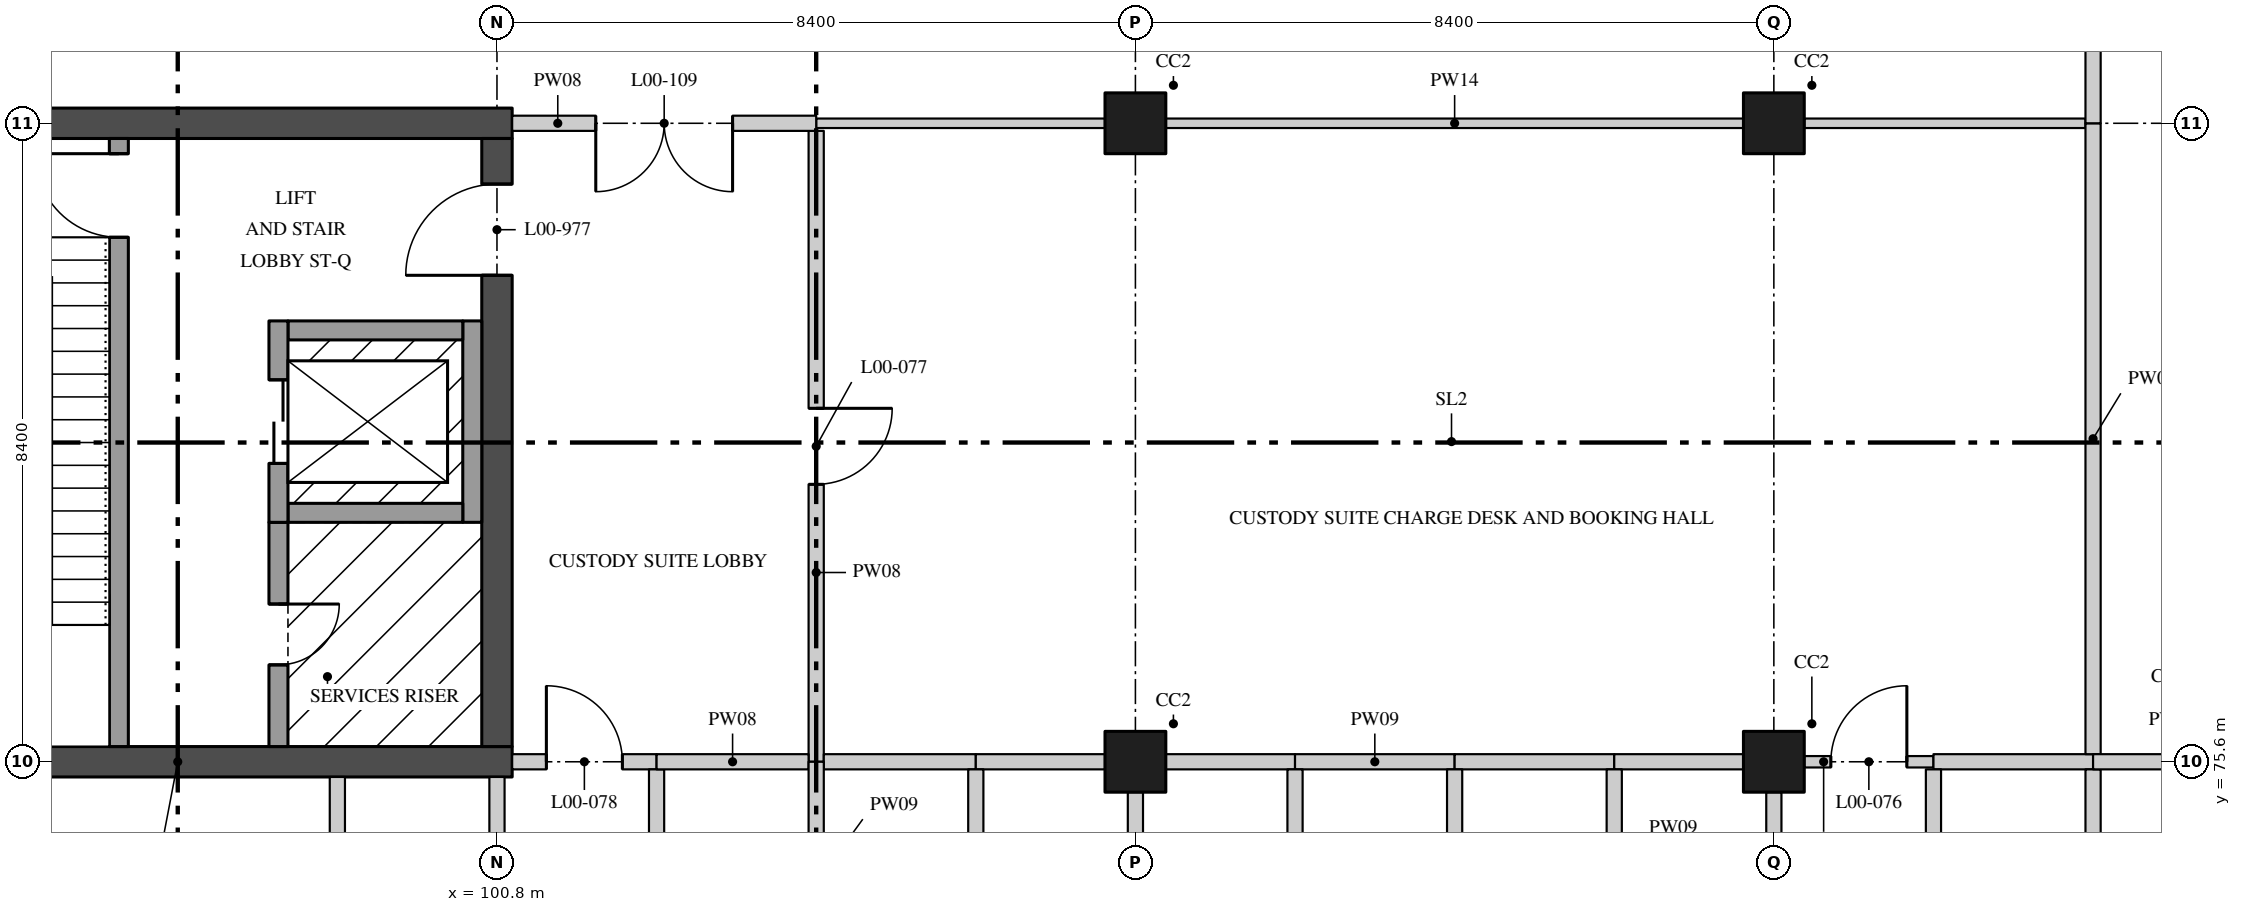
"""IFC4 building model, lengths in metres.
Left out: names, types, materials, properties, quantities, classifications, styles, units other than length and angle.
Written with IfcOpenShell. Run it as: python <this file> out.ifc"""

import sys

from ifc_helpers import new_model, si_unit, direction, frame, frame_2d, origin, origin_2d, place, context, subcontext, project, spatial, rectangle, extrude, element, fill, save


model = new_model("IFC4")
c1 = context("Model", 3, precision=1e-05, world=origin(), true_north=direction((0.0, 1.0)))
c2 = subcontext(c1, "Body", "Model", "MODEL_VIEW")
j1 = project(units=[si_unit("LENGTHUNIT", "METRE"), si_unit("PLANEANGLEUNIT", "RADIAN")], contexts=[c1])
p1 = place(None, origin())
s1 = spatial("IfcSite", under=j1, at=p1, CompositionType="ELEMENT")
p2 = place(p1, origin())
s2 = spatial("IfcBuilding", under=s1, at=p2, CompositionType="ELEMENT")
p3 = place(p2, origin())
s3 = spatial("IfcBuildingStorey", under=s2, at=p3, CompositionType="ELEMENT", Elevation=0.0)
for number, where, z_axis, x_axis in (
    (1, (109.2, 75.6, 0.0), (0.0, 0.0, 1.0), (1.0, 0.0, 0.0)),
    (2, (109.2, 84.0, 0.0), (0.0, 0.0, 1.0), (1.0, 0.0, 0.0)),
    (3, (117.6, 75.6, 0.0), (0.0, 0.0, 1.0), (1.0, 0.0, 0.0)),
    (4, (117.6, 84.0, 0.0), (0.0, 0.0, 1.0), (1.0, 0.0, 0.0)),
):
    element("IfcColumn", number, at=place(p3, frame(where, z_axis=z_axis, x_axis=x_axis)), inside=s3, PredefinedType="COLUMN", context=c2, shape_type="SweptSolid", body=[
        extrude(rectangle(XDim=0.8, YDim=0.8, at=origin_2d()), origin(), (0.0, 0.0, 1.0), 5.05),
    ])
for number, where, z_axis, x_axis in (
    (5, (92.2, 75.6, 0.0), (0.0, 0.0, 1.0), (1.0, 0.0, 0.0)),
    (6, (92.2, 84.0, 0.0), (0.0, 0.0, 1.0), (1.0, 0.0, 0.0)),
):
    element("IfcWall", number, at=place(p3, frame(where, z_axis=z_axis, x_axis=x_axis)), inside=s3, PredefinedType="SHEAR", context=c2, shape_type="SweptSolid", body=[
        extrude(rectangle(XDim=8.8, YDim=0.4, at=frame_2d((4.4, 0.0))), origin(), (0.0, 0.0, 1.0), 5.05),
    ])
p4 = place(p3, frame((100.8, 75.8, 0.0), z_axis=(0.0, 0.0, 1.0), x_axis=(0.0, 1.0, 0.0)))
e7 = element("IfcWall", 7, at=p4, inside=s3, PredefinedType="SHEAR", context=c2, shape_type="SweptSolid", body=[
    extrude(rectangle(XDim=8.0, YDim=0.4, at=frame_2d((4.0, 0.0))), origin(), (0.0, 0.0, 1.0), 5.05),
])
p5 = place(p4, frame((6.2, 0.0, 0.0)))
e8 = element("IfcOpeningElement", 8, at=p5, cuts=e7, PredefinedType="OPENING", context=c2, shape_type="SweptSolid", body=[
    extrude(rectangle(XDim=1.2, YDim=2.1, at=frame_2d((0.6, 1.05))), frame((0.0, 0.21, 0.0), z_axis=(0.0, -1.0, 0.0), x_axis=(1.0, 0.0, 0.0)), (0.0, 0.0, 1.0), 0.42),
])
p6 = place(p3, frame((95.825, 83.8, 0.0), z_axis=(0.0, 0.0, 1.0), x_axis=(0.0, -1.0, 0.0)))
e9 = element("IfcWall", 9, at=p6, inside=s3, PredefinedType="SOLIDWALL", context=c2, shape_type="SweptSolid", body=[
    extrude(rectangle(XDim=8.0, YDim=0.25, at=frame_2d((4.0, 0.0))), origin(), (0.0, 0.0, 1.0), 5.05),
])
p7 = place(p6, frame((0.2, 0.0, 0.0)))
e10 = element("IfcOpeningElement", 10, at=p7, cuts=e9, PredefinedType="OPENING", context=c2, shape_type="SweptSolid", body=[
    extrude(rectangle(XDim=1.1, YDim=2.1, at=frame_2d((0.55, 1.05))), frame((0.0, 0.135, 0.0), z_axis=(0.0, -1.0, 0.0), x_axis=(1.0, 0.0, 0.0)), (0.0, 0.0, 1.0), 0.27),
])
p8 = place(p3, frame((97.925, 78.75, 0.0), z_axis=(0.0, 0.0, 1.0), x_axis=(0.0, -1.0, 0.0)))
e11 = element("IfcWall", 11, at=p8, inside=s3, PredefinedType="SOLIDWALL", context=c2, shape_type="SweptSolid", body=[
    extrude(rectangle(XDim=2.95, YDim=0.25, at=frame_2d((1.475, 0.0))), origin(), (0.0, 0.0, 1.0), 5.05),
])
p9 = place(p8, frame((1.075, 0.0, 0.0)))
e12 = element("IfcOpeningElement", 12, at=p9, cuts=e11, PredefinedType="OPENING", context=c2, shape_type="SweptSolid", body=[
    extrude(rectangle(XDim=0.8, YDim=2.1, at=frame_2d((0.4, 1.05))), frame((0.0, 0.135, 0.0), z_axis=(0.0, -1.0, 0.0), x_axis=(1.0, 0.0, 0.0)), (0.0, 0.0, 1.0), 0.27),
])
p10 = place(p3, frame((100.475, 78.75, 0.0), z_axis=(0.0, 0.0, 1.0), x_axis=(0.0, 1.0, 0.0)))
e13 = element("IfcWall", 13, at=p10, inside=s3, PredefinedType="SOLIDWALL", context=c2, shape_type="SweptSolid", body=[
    extrude(rectangle(XDim=2.65, YDim=0.25, at=frame_2d((1.325, 0.0))), origin(), (0.0, 0.0, 1.0), 5.05),
])
for number, where, z_axis, x_axis in (
    (14, (98.05, 81.275, 0.0), (0.0, 0.0, 1.0), (1.0, 0.0, 0.0)),
    (15, (98.05, 78.875, 0.0), (0.0, 0.0, 1.0), (1.0, 0.0, 0.0)),
):
    element("IfcWall", number, at=place(p3, frame(where, z_axis=z_axis, x_axis=x_axis)), inside=s3, PredefinedType="SOLIDWALL", context=c2, shape_type="SweptSolid", body=[
        extrude(rectangle(XDim=2.3, YDim=0.25, at=frame_2d((1.15, 0.0))), origin(), (0.0, 0.0, 1.0), 5.05),
    ])
p11 = place(p3, frame((97.925, 78.75, 0.0), z_axis=(0.0, 0.0, 1.0), x_axis=(0.0, 1.0, 0.0)))
e16 = element("IfcWall", 16, at=p11, inside=s3, PredefinedType="SOLIDWALL", context=c2, shape_type="SweptSolid", body=[
    extrude(rectangle(XDim=2.65, YDim=0.25, at=frame_2d((1.325, 0.0))), origin(), (0.0, 0.0, 1.0), 5.05),
])
p12 = place(p11, frame((0.775, 0.0, 0.0)))
e17 = element("IfcOpeningElement", 17, at=p12, cuts=e16, PredefinedType="OPENING", context=c2, shape_type="SweptSolid", body=[
    extrude(rectangle(XDim=1.1, YDim=2.1, at=frame_2d((0.55, 1.05))), frame((0.0, 0.135, 0.0), z_axis=(0.0, -1.0, 0.0), x_axis=(1.0, 0.0, 0.0)), (0.0, 0.0, 1.0), 0.27),
])
p13 = place(p3, frame((118.0, 75.6, 0.0), z_axis=(0.0, 0.0, 1.0), x_axis=(1.0, 0.0, 0.0)))
e18 = element("IfcWall", 18, at=p13, inside=s3, PredefinedType="PARTITIONING", context=c2, shape_type="SweptSolid", body=[
    extrude(rectangle(XDim=1.7, YDim=0.15, at=frame_2d((0.85, 0.0))), origin(), (0.0, 0.0, 1.0), 5.05),
])
p14 = place(p13, frame((0.35, 0.0, 0.0)))
e19 = element("IfcOpeningElement", 19, at=p14, cuts=e18, PredefinedType="OPENING", context=c2, shape_type="SweptSolid", body=[
    extrude(rectangle(XDim=1.0, YDim=2.4, at=frame_2d((0.5, 1.2))), frame((0.0, 0.085, 0.0), z_axis=(0.0, -1.0, 0.0), x_axis=(1.0, 0.0, 0.0)), (0.0, 0.0, 1.0), 0.17),
])
p15 = place(p3, frame((105.0, 75.6, 0.0), z_axis=(0.0, 0.0, 1.0), x_axis=(0.0, 1.0, 0.0)))
e20 = element("IfcWall", 20, at=p15, inside=s3, PredefinedType="PARTITIONING", context=c2, shape_type="SweptSolid", body=[
    extrude(rectangle(XDim=8.3, YDim=0.2, at=frame_2d((4.15, 0.0))), origin(), (0.0, 0.0, 1.0), 5.05),
])
p16 = place(p15, frame((3.65, 0.0, 0.0)))
e21 = element("IfcOpeningElement", 21, at=p16, cuts=e20, PredefinedType="OPENING", context=c2, shape_type="SweptSolid", body=[
    extrude(rectangle(XDim=1.0, YDim=2.4, at=frame_2d((0.5, 1.2))), frame((0.0, 0.11, 0.0), z_axis=(0.0, -1.0, 0.0), x_axis=(1.0, 0.0, 0.0)), (0.0, 0.0, 1.0), 0.22),
])
p17 = place(p3, frame((105.1, 75.6, 0.0), z_axis=(0.0, 0.0, 1.0), x_axis=(1.0, 0.0, 0.0)))
e22 = element("IfcWall", 22, at=p17, inside=s3, PredefinedType="PARTITIONING", context=c2, shape_type="SweptSolid", body=[
    extrude(rectangle(XDim=2.0, YDim=0.2, at=frame_2d((1.0, 0.0))), origin(), (0.0, 0.0, 1.0), 5.05),
])
for number, where, z_axis, x_axis in (
    (23, (107.1, 75.6, 0.0), (0.0, 0.0, 1.0), (1.0, 0.0, 0.0)),
    (24, (109.6, 75.6, 0.0), (0.0, 0.0, 1.0), (1.0, 0.0, 0.0)),
):
    element("IfcWall", number, at=place(p3, frame(where, z_axis=z_axis, x_axis=x_axis)), inside=s3, PredefinedType="PARTITIONING", context=c2, shape_type="SweptSolid", body=[
        extrude(rectangle(XDim=1.7, YDim=0.2, at=frame_2d((0.85, 0.0))), origin(), (0.0, 0.0, 1.0), 5.05),
    ])
p18 = place(p3, frame((111.3, 75.6, 0.0), z_axis=(0.0, 0.0, 1.0), x_axis=(1.0, 0.0, 0.0)))
e25 = element("IfcWall", 25, at=p18, inside=s3, PredefinedType="PARTITIONING", context=c2, shape_type="SweptSolid", body=[
    extrude(rectangle(XDim=2.1, YDim=0.2, at=frame_2d((1.05, 0.0))), origin(), (0.0, 0.0, 1.0), 5.05),
])
p19 = place(p3, frame((113.4, 75.6, 0.0), z_axis=(0.0, 0.0, 1.0), x_axis=(1.0, 0.0, 0.0)))
e26 = element("IfcWall", 26, at=p19, inside=s3, PredefinedType="PARTITIONING", context=c2, shape_type="SweptSolid", body=[
    extrude(rectangle(XDim=2.1, YDim=0.2, at=frame_2d((1.05, 0.0))), origin(), (0.0, 0.0, 1.0), 5.05),
])
p20 = place(p3, frame((115.5, 75.6, 0.0), z_axis=(0.0, 0.0, 1.0), x_axis=(1.0, 0.0, 0.0)))
e27 = element("IfcWall", 27, at=p20, inside=s3, PredefinedType="PARTITIONING", context=c2, shape_type="SweptSolid", body=[
    extrude(rectangle(XDim=1.7, YDim=0.2, at=frame_2d((0.85, 0.0))), origin(), (0.0, 0.0, 1.0), 5.05),
])
p21 = place(p3, frame((119.7, 75.6, 0.0), z_axis=(0.0, 0.0, 1.0), x_axis=(1.0, 0.0, 0.0)))
e28 = element("IfcWall", 28, at=p21, inside=s3, PredefinedType="PARTITIONING", context=c2, shape_type="SweptSolid", body=[
    extrude(rectangle(XDim=2.1, YDim=0.2, at=frame_2d((1.05, 0.0))), origin(), (0.0, 0.0, 1.0), 5.05),
])
p22 = place(p3, frame((105.0, 84.0, 0.0), z_axis=(0.0, 0.0, 1.0), x_axis=(1.0, 0.0, 0.0)))
e29 = element("IfcWall", 29, at=p22, inside=s3, PredefinedType="PARTITIONING", context=c2, shape_type="SweptSolid", body=[
    extrude(rectangle(XDim=3.8, YDim=0.125, at=frame_2d((1.9, 0.0))), origin(), (0.0, 0.0, 1.0), 5.05),
])
p23 = place(p3, frame((109.6, 84.0, 0.0), z_axis=(0.0, 0.0, 1.0), x_axis=(1.0, 0.0, 0.0)))
e30 = element("IfcWall", 30, at=p23, inside=s3, PredefinedType="PARTITIONING", context=c2, shape_type="SweptSolid", body=[
    extrude(rectangle(XDim=7.6, YDim=0.125, at=frame_2d((3.8, 0.0))), origin(), (0.0, 0.0, 1.0), 5.05),
])
p24 = place(p3, frame((118.0, 84.0, 0.0), z_axis=(0.0, 0.0, 1.0), x_axis=(1.0, 0.0, 0.0)))
e31 = element("IfcWall", 31, at=p24, inside=s3, PredefinedType="PARTITIONING", context=c2, shape_type="SweptSolid", body=[
    extrude(rectangle(XDim=3.7, YDim=0.125, at=frame_2d((1.85, 0.0))), origin(), (0.0, 0.0, 1.0), 5.05),
])
p25 = place(p3, frame((121.8, 75.7, 0.0), z_axis=(0.0, 0.0, 1.0), x_axis=(0.0, 1.0, 0.0)))
e32 = element("IfcWall", 32, at=p25, inside=s3, PredefinedType="PARTITIONING", context=c2, shape_type="SweptSolid", body=[
    extrude(rectangle(XDim=8.3, YDim=0.2, at=frame_2d((4.15, 0.0))), origin(), (0.0, 0.0, 1.0), 5.05),
])
p26 = place(p3, frame((101.0, 75.6, 0.0), z_axis=(0.0, 0.0, 1.0), x_axis=(1.0, 0.0, 0.0)))
e33 = element("IfcWall", 33, at=p26, inside=s3, PredefinedType="PARTITIONING", context=c2, shape_type="SweptSolid", body=[
    extrude(rectangle(XDim=1.9, YDim=0.2, at=frame_2d((0.95, 0.0))), origin(), (0.0, 0.0, 1.0), 5.05),
])
p27 = place(p26, frame((0.45, 0.0, 0.0)))
e34 = element("IfcOpeningElement", 34, at=p27, cuts=e33, PredefinedType="OPENING", context=c2, shape_type="SweptSolid", body=[
    extrude(rectangle(XDim=1.0, YDim=2.4, at=frame_2d((0.5, 1.2))), frame((0.0, 0.11, 0.0), z_axis=(0.0, -1.0, 0.0), x_axis=(1.0, 0.0, 0.0)), (0.0, 0.0, 1.0), 0.22),
])
p28 = place(p3, frame((100.8, 72.4, 0.0), z_axis=(0.0, 0.0, 1.0), x_axis=(0.0, 1.0, 0.0)))
e35 = element("IfcWall", 35, at=p28, inside=s3, PredefinedType="PARTITIONING", context=c2, shape_type="SweptSolid", body=[
    extrude(rectangle(XDim=3.0, YDim=0.2, at=frame_2d((1.5, 0.0))), origin(), (0.0, 0.0, 1.0), 5.05),
])
p29 = place(p3, frame((102.9, 72.2, 0.0), z_axis=(0.0, 0.0, 1.0), x_axis=(0.0, 1.0, 0.0)))
e36 = element("IfcWall", 36, at=p29, inside=s3, PredefinedType="PARTITIONING", context=c2, shape_type="SweptSolid", body=[
    extrude(rectangle(XDim=3.3, YDim=0.2, at=frame_2d((1.65, 0.0))), origin(), (0.0, 0.0, 1.0), 5.05),
])
p30 = place(p3, frame((117.6, 72.4, 0.0), z_axis=(0.0, 0.0, 1.0), x_axis=(0.0, 1.0, 0.0)))
e37 = element("IfcWall", 37, at=p30, inside=s3, PredefinedType="PARTITIONING", context=c2, shape_type="SweptSolid", body=[
    extrude(rectangle(XDim=2.8, YDim=0.2, at=frame_2d((1.4, 0.0))), origin(), (0.0, 0.0, 1.0), 5.05),
])
p31 = place(p3, frame((119.7, 72.2, 0.0), z_axis=(0.0, 0.0, 1.0), x_axis=(0.0, 1.0, 0.0)))
e38 = element("IfcWall", 38, at=p31, inside=s3, PredefinedType="PARTITIONING", context=c2, shape_type="SweptSolid", body=[
    extrude(rectangle(XDim=3.3, YDim=0.2, at=frame_2d((1.65, 0.0))), origin(), (0.0, 0.0, 1.0), 5.05),
])
p32 = place(p3, frame((102.9, 75.6, 0.0), z_axis=(0.0, 0.0, 1.0), x_axis=(1.0, 0.0, 0.0)))
e39 = element("IfcWall", 39, at=p32, inside=s3, PredefinedType="PARTITIONING", context=c2, shape_type="SweptSolid", body=[
    extrude(rectangle(XDim=2.0, YDim=0.2, at=frame_2d((1.0, 0.0))), origin(), (0.0, 0.0, 1.0), 5.05),
])
p33 = place(p3, frame((101.0, 84.0, 0.0), z_axis=(0.0, 0.0, 1.0), x_axis=(1.0, 0.0, 0.0)))
e40 = element("IfcWall", 40, at=p33, inside=s3, PredefinedType="PARTITIONING", context=c2, shape_type="SweptSolid", body=[
    extrude(rectangle(XDim=4.0, YDim=0.2, at=frame_2d((2.0, 0.0))), origin(), (0.0, 0.0, 1.0), 5.05),
])
p34 = place(p33, frame((1.1, 0.0, 0.0)))
e41 = element("IfcOpeningElement", 41, at=p34, cuts=e40, PredefinedType="OPENING", context=c2, shape_type="SweptSolid", body=[
    extrude(rectangle(XDim=1.8, YDim=2.1, at=frame_2d((0.9, 1.05))), frame((0.0, 0.11, 0.0), z_axis=(0.0, -1.0, 0.0), x_axis=(1.0, 0.0, 0.0)), (0.0, 0.0, 1.0), 0.22),
])
p35 = place(p3, frame((98.7, 72.4, 0.0), z_axis=(0.0, 0.0, 1.0), x_axis=(0.0, 1.0, 0.0)))
e42 = element("IfcWall", 42, at=p35, inside=s3, PredefinedType="PARTITIONING", context=c2, shape_type="SweptSolid", body=[
    extrude(rectangle(XDim=3.0, YDim=0.2, at=frame_2d((1.5, 0.0))), origin(), (0.0, 0.0, 1.0), 5.05),
])
p36 = place(p3, frame((105.0, 72.4, 0.0), z_axis=(0.0, 0.0, 1.0), x_axis=(0.0, 1.0, 0.0)))
e43 = element("IfcWall", 43, at=p36, inside=s3, PredefinedType="PARTITIONING", context=c2, shape_type="SweptSolid", body=[
    extrude(rectangle(XDim=3.2, YDim=0.2, at=frame_2d((1.6, 0.0))), origin(), (0.0, 0.0, 1.0), 5.05),
])
p37 = place(p3, frame((107.1, 72.4, 0.0), z_axis=(0.0, 0.0, 1.0), x_axis=(0.0, 1.0, 0.0)))
e44 = element("IfcWall", 44, at=p37, inside=s3, PredefinedType="PARTITIONING", context=c2, shape_type="SweptSolid", body=[
    extrude(rectangle(XDim=3.1, YDim=0.2, at=frame_2d((1.55, 0.0))), origin(), (0.0, 0.0, 1.0), 5.05),
])
p38 = place(p3, frame((109.2, 72.4, 0.0), z_axis=(0.0, 0.0, 1.0), x_axis=(0.0, 1.0, 0.0)))
e45 = element("IfcWall", 45, at=p38, inside=s3, PredefinedType="PARTITIONING", context=c2, shape_type="SweptSolid", body=[
    extrude(rectangle(XDim=2.8, YDim=0.2, at=frame_2d((1.4, 0.0))), origin(), (0.0, 0.0, 1.0), 5.05),
])
for number, where, z_axis, x_axis in (
    (46, (111.3, 72.4, 0.0), (0.0, 0.0, 1.0), (0.0, 1.0, 0.0)),
    (47, (113.4, 72.4, 0.0), (0.0, 0.0, 1.0), (0.0, 1.0, 0.0)),
    (48, (115.5, 72.4, 0.0), (0.0, 0.0, 1.0), (0.0, 1.0, 0.0)),
    (49, (121.8, 72.4, 0.0), (0.0, 0.0, 1.0), (0.0, 1.0, 0.0)),
):
    element("IfcWall", number, at=place(p3, frame(where, z_axis=z_axis, x_axis=x_axis)), inside=s3, PredefinedType="PARTITIONING", context=c2, shape_type="SweptSolid", body=[
        extrude(rectangle(XDim=3.1, YDim=0.2, at=frame_2d((1.55, 0.0))), origin(), (0.0, 0.0, 1.0), 5.05),
    ])
p39 = place(p3, frame((121.8, 75.6, 0.0), z_axis=(0.0, 0.0, 1.0), x_axis=(1.0, 0.0, 0.0)))
e50 = element("IfcWall", 50, at=p39, inside=s3, PredefinedType="PARTITIONING", context=c2, shape_type="SweptSolid", body=[
    extrude(rectangle(XDim=2.1, YDim=0.2, at=frame_2d((1.05, 0.0))), origin(), (0.0, 0.0, 1.0), 5.05),
])
p40 = place(p3, frame((121.8, 84.0, 0.0), z_axis=(0.0, 0.0, 1.0), x_axis=(0.0, 1.0, 0.0)))
e51 = element("IfcWall", 51, at=p40, inside=s3, PredefinedType="PARTITIONING", context=c2, shape_type="SweptSolid", body=[
    extrude(rectangle(XDim=8.25, YDim=0.2, at=frame_2d((4.125, 0.0))), origin(), (0.0, 0.0, 1.0), 5.05),
])
p41 = place(p5, origin())
e52 = element("IfcDoor", 52, at=p41, inside=s3, OperationType="SINGLE_SWING_RIGHT", PredefinedType="DOOR", context=c2, shape_type="SweptSolid", body=[
    extrude(rectangle(XDim=1.2, YDim=2.1, at=frame_2d((0.6, 1.05))), frame((0.0, 0.035, 0.0), z_axis=(0.0, -1.0, 0.0), x_axis=(1.0, 0.0, 0.0)), (0.0, 0.0, 1.0), 0.07),
])
fill(e8, e52)
p42 = place(p9, origin())
e53 = element("IfcDoor", 53, at=p42, inside=s3, OperationType="SINGLE_SWING_RIGHT", PredefinedType="DOOR", context=c2, shape_type="SweptSolid", body=[
    extrude(rectangle(XDim=0.8, YDim=2.1, at=frame_2d((0.4, 1.05))), frame((0.0, 0.035, 0.0), z_axis=(0.0, -1.0, 0.0), x_axis=(1.0, 0.0, 0.0)), (0.0, 0.0, 1.0), 0.07),
])
fill(e12, e53)
p43 = place(p7, frame((1.1, 0.0, 0.0), z_axis=(0.0, 0.0, 1.0), x_axis=(-1.0, 0.0, 0.0)))
e54 = element("IfcDoor", 54, at=p43, inside=s3, OperationType="SINGLE_SWING_LEFT", PredefinedType="DOOR", context=c2, shape_type="SweptSolid", body=[
    extrude(rectangle(XDim=1.1, YDim=2.1, at=frame_2d((0.55, 1.05))), frame((0.0, 0.035, 0.0), z_axis=(0.0, -1.0, 0.0), x_axis=(1.0, 0.0, 0.0)), (0.0, 0.0, 1.0), 0.07),
])
fill(e10, e54)
p44 = place(p12, origin())
e55 = element("IfcDoor", 55, at=p44, inside=s3, OperationType="DOUBLE_DOOR_SLIDING", PredefinedType="DOOR", context=c2, shape_type="SweptSolid", body=[
    extrude(rectangle(XDim=1.1, YDim=2.1, at=frame_2d((0.55, 1.05))), frame((0.0, 0.04, 0.0), z_axis=(0.0, -1.0, 0.0), x_axis=(1.0, 0.0, 0.0)), (0.0, 0.0, 1.0), 0.08),
])
fill(e17, e55)
p45 = place(p14, origin())
e56 = element("IfcDoor", 56, at=p45, inside=s3, OperationType="SINGLE_SWING_LEFT", PredefinedType="DOOR", context=c2, shape_type="SweptSolid", body=[
    extrude(rectangle(XDim=1.0, YDim=2.4, at=frame_2d((0.5, 1.2))), frame((0.0, 0.025, 0.0), z_axis=(0.0, -1.0, 0.0), x_axis=(1.0, 0.0, 0.0)), (0.0, 0.0, 1.0), 0.05),
])
fill(e19, e56)
p46 = place(p16, frame((1.0, 0.0, 0.0), z_axis=(0.0, 0.0, 1.0), x_axis=(-1.0, 0.0, 0.0)))
e57 = element("IfcDoor", 57, at=p46, inside=s3, OperationType="SINGLE_SWING_RIGHT", PredefinedType="DOOR", context=c2, shape_type="SweptSolid", body=[
    extrude(rectangle(XDim=1.0, YDim=2.4, at=frame_2d((0.5, 1.2))), frame((0.0, 0.035, 0.0), z_axis=(0.0, -1.0, 0.0), x_axis=(1.0, 0.0, 0.0)), (0.0, 0.0, 1.0), 0.07),
])
fill(e21, e57)
p47 = place(p27, origin())
e58 = element("IfcDoor", 58, at=p47, inside=s3, OperationType="SINGLE_SWING_RIGHT", PredefinedType="DOOR", context=c2, shape_type="SweptSolid", body=[
    extrude(rectangle(XDim=1.0, YDim=2.4, at=frame_2d((0.5, 1.2))), frame((0.0, 0.03, 0.0), z_axis=(0.0, -1.0, 0.0), x_axis=(1.0, 0.0, 0.0)), (0.0, 0.0, 1.0), 0.06),
])
fill(e34, e58)
p48 = place(p34, frame((1.8, 0.0, 0.0), z_axis=(0.0, 0.0, 1.0), x_axis=(-1.0, 0.0, 0.0)))
e59 = element("IfcDoor", 59, at=p48, inside=s3, OperationType="DOUBLE_DOOR_SINGLE_SWING", PredefinedType="DOOR", context=c2, shape_type="SweptSolid", body=[
    extrude(rectangle(XDim=1.8, YDim=2.1, at=frame_2d((0.9, 1.05))), frame((0.0, 0.03, 0.0), z_axis=(0.0, -1.0, 0.0), x_axis=(1.0, 0.0, 0.0)), (0.0, 0.0, 1.0), 0.06),
])
fill(e41, e59)
save(model, sys.argv[1])
